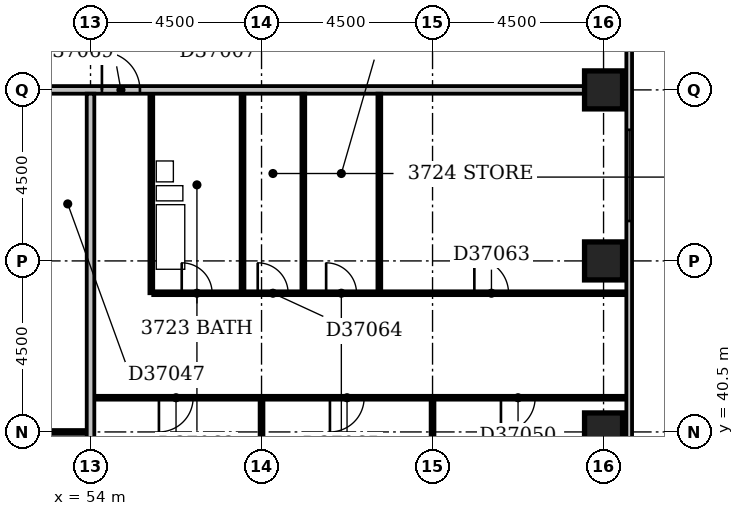
"""IFC4 building model, lengths in metres.
Left out: names, types, materials, properties, quantities, classifications, styles, units other than length and angle.
Written with IfcOpenShell. Run it as: python <this file> out.ifc"""

import sys

from ifc_helpers import new_model, si_unit, direction, frame, frame_2d, origin, origin_2d, place, context, subcontext, project, spatial, rectangle, extrude, element, fill, save


model = new_model("IFC4")
c1 = context("Model", 3, precision=1e-05, world=origin(), true_north=direction((0.0, 1.0)))
c2 = subcontext(c1, "Body", "Model", "MODEL_VIEW")
j1 = project(units=[si_unit("LENGTHUNIT", "METRE"), si_unit("PLANEANGLEUNIT", "RADIAN")], contexts=[c1])
p1 = place(None, origin())
s1 = spatial("IfcSite", under=j1, at=p1, CompositionType="ELEMENT")
p2 = place(p1, origin())
s2 = spatial("IfcBuilding", under=s1, at=p2, CompositionType="ELEMENT")
p3 = place(p2, frame((0.0, 0.0, 148.4)))
s3 = spatial("IfcBuildingStorey", under=s2, at=p3, CompositionType="ELEMENT", Elevation=148.4)
for number, where, z_axis, x_axis in (
    (1, (67.5, 40.5, -0.3), (0.0, 0.0, 1.0), (1.0, 0.0, 0.0)),
    (2, (67.5, 45.0, -0.3), (0.0, 0.0, 1.0), (1.0, 0.0, 0.0)),
    (3, (67.5, 49.5, -0.3), (0.0, 0.0, 1.0), (1.0, 0.0, 0.0)),
):
    element("IfcColumn", number, at=place(p3, frame(where, z_axis=z_axis, x_axis=x_axis)), inside=s3, PredefinedType="COLUMN", context=c2, shape_type="SweptSolid", body=[
        extrude(rectangle(XDim=1.0, YDim=1.0, at=origin_2d()), origin(), (0.0, 0.0, 1.0), 3.6),
    ])
p4 = place(p3, frame((68.175, 35.4, 0.0), z_axis=(0.0, 0.0, 1.0), x_axis=(0.0, 1.0, 0.0)))
e4 = element("IfcWall", 4, at=p4, inside=s3, PredefinedType="STANDARD", context=c2, shape_type="SweptSolid", body=[
    extrude(rectangle(XDim=23.85, YDim=0.15, at=frame_2d((11.925, 0.0))), origin(), (0.0, 0.0, 1.0), 2.7),
])
p5 = place(p4, frame((1.65, 0.0, 0.6)))
e5 = element("IfcOpeningElement", 5, at=p5, cuts=e4, PredefinedType="OPENING", context=c2, shape_type="SweptSolid", body=[
    extrude(rectangle(XDim=2.4, YDim=1.8, at=frame_2d((1.2, 0.9))), frame((0.0, 0.087, 0.0), z_axis=(0.0, -1.0, 0.0), x_axis=(1.0, 0.0, 0.0)), (0.0, 0.0, 1.0), 0.174),
])
p6 = place(p4, frame((10.65, 0.0, 0.6)))
e6 = element("IfcOpeningElement", 6, at=p6, cuts=e4, PredefinedType="OPENING", context=c2, shape_type="SweptSolid", body=[
    extrude(rectangle(XDim=2.4, YDim=1.8, at=frame_2d((1.2, 0.9))), frame((0.0, 0.087, 0.0), z_axis=(0.0, -1.0, 0.0), x_axis=(1.0, 0.0, 0.0)), (0.0, 0.0, 1.0), 0.174),
])
p7 = place(p4, frame((19.973, 0.0, 0.6)))
e7 = element("IfcOpeningElement", 7, at=p7, cuts=e4, PredefinedType="OPENING", context=c2, shape_type="SweptSolid", body=[
    extrude(rectangle(XDim=2.4, YDim=1.8, at=frame_2d((1.2, 0.9))), frame((0.0, 0.087, 0.0), z_axis=(0.0, -1.0, 0.0), x_axis=(1.0, 0.0, 0.0)), (0.0, 0.0, 1.0), 0.174),
])
p8 = place(p3, frame((54.0, 36.5, 0.0), z_axis=(0.0, 0.0, 1.0), x_axis=(0.0, 1.0, 0.0)))
e8 = element("IfcWall", 8, at=p8, inside=s3, PredefinedType="PARTITIONING", context=c2, shape_type="SweptSolid", body=[
    extrude(rectangle(XDim=12.9, YDim=0.2, at=frame_2d((6.45, 0.0))), origin(), (0.0, 0.0, 1.0), 2.6),
])
p9 = place(p3, frame((58.5, 36.5, 0.0), z_axis=(0.0, 0.0, 1.0), x_axis=(0.0, 1.0, 0.0)))
e9 = element("IfcWall", 9, at=p9, inside=s3, PredefinedType="PARTITIONING", context=c2, shape_type="SweptSolid", body=[
    extrude(rectangle(XDim=4.85, YDim=0.1, at=frame_2d((2.425, 0.0))), origin(), (0.0, 0.0, 1.0), 3.3),
])
p10 = place(p3, frame((63.0, 36.5, 0.0), z_axis=(0.0, 0.0, 1.0), x_axis=(0.0, 1.0, 0.0)))
e10 = element("IfcWall", 10, at=p10, inside=s3, PredefinedType="PARTITIONING", context=c2, shape_type="SweptSolid", body=[
    extrude(rectangle(XDim=4.85, YDim=0.1, at=frame_2d((2.425, 0.0))), origin(), (0.0, 0.0, 1.0), 2.4),
])
p11 = place(p3, frame((49.6, 40.5, 0.0), z_axis=(0.0, 0.0, 1.0), x_axis=(1.0, 0.0, 0.0)))
e11 = element("IfcWall", 11, at=p11, inside=s3, PredefinedType="PARTITIONING", context=c2, shape_type="SweptSolid", body=[
    extrude(rectangle(XDim=4.3, YDim=0.1, at=frame_2d((2.15, 0.0))), origin(), (0.0, 0.0, 1.0), 3.3),
])
p12 = place(p11, frame((1.7, 0.0, 0.0)))
e12 = element("IfcOpeningElement", 12, at=p12, cuts=e11, PredefinedType="OPENING", context=c2, shape_type="SweptSolid", body=[
    extrude(rectangle(XDim=0.9, YDim=2.1, at=frame_2d((0.45, 1.05))), frame((0.0, 0.062, 0.0), z_axis=(0.0, -1.0, 0.0), x_axis=(1.0, 0.0, 0.0)), (0.0, 0.0, 1.0), 0.124),
])
p13 = place(p3, frame((54.1, 41.4, 0.0), z_axis=(0.0, 0.0, 1.0), x_axis=(1.0, 0.0, 0.0)))
e13 = element("IfcWall", 13, at=p13, inside=s3, PredefinedType="PARTITIONING", context=c2, shape_type="SweptSolid", body=[
    extrude(rectangle(XDim=14.0, YDim=0.1, at=frame_2d((7.0, 0.0))), origin(), (0.0, 0.0, 1.0), 3.3),
])
p14 = place(p13, frame((1.7, 0.0, 0.0)))
e14 = element("IfcOpeningElement", 14, at=p14, cuts=e13, PredefinedType="OPENING", context=c2, shape_type="SweptSolid", body=[
    extrude(rectangle(XDim=0.9, YDim=2.1, at=frame_2d((0.45, 1.05))), frame((0.0, 0.062, 0.0), z_axis=(0.0, -1.0, 0.0), x_axis=(1.0, 0.0, 0.0)), (0.0, 0.0, 1.0), 0.124),
])
p15 = place(p13, frame((6.2, 0.0, 0.0)))
e15 = element("IfcOpeningElement", 15, at=p15, cuts=e13, PredefinedType="OPENING", context=c2, shape_type="SweptSolid", body=[
    extrude(rectangle(XDim=0.9, YDim=2.1, at=frame_2d((0.45, 1.05))), frame((0.0, 0.062, 0.0), z_axis=(0.0, -1.0, 0.0), x_axis=(1.0, 0.0, 0.0)), (0.0, 0.0, 1.0), 0.124),
])
p16 = place(p13, frame((10.7, 0.0, 0.0)))
e16 = element("IfcOpeningElement", 16, at=p16, cuts=e13, PredefinedType="OPENING", context=c2, shape_type="SweptSolid", body=[
    extrude(rectangle(XDim=0.9, YDim=2.1, at=frame_2d((0.45, 1.05))), frame((0.0, 0.062, 0.0), z_axis=(0.0, -1.0, 0.0), x_axis=(1.0, 0.0, 0.0)), (0.0, 0.0, 1.0), 0.124),
])
p17 = place(p3, frame((55.6, 44.15, 0.0), z_axis=(0.0, 0.0, 1.0), x_axis=(0.0, 1.0, 0.0)))
e17 = element("IfcWall", 17, at=p17, inside=s3, PredefinedType="PLUMBINGWALL", context=c2, shape_type="SweptSolid", body=[
    extrude(rectangle(XDim=5.25, YDim=0.1, at=frame_2d((2.625, 0.0))), origin(), (0.0, 0.0, 1.0), 3.3),
])
p18 = place(p3, frame((55.65, 44.15, 0.0), z_axis=(0.0, 0.0, 1.0), x_axis=(1.0, 0.0, 0.0)))
e18 = element("IfcWall", 18, at=p18, inside=s3, PredefinedType="PARTITIONING", context=c2, shape_type="SweptSolid", body=[
    extrude(rectangle(XDim=12.45, YDim=0.1, at=frame_2d((6.225, 0.0))), origin(), (0.0, 0.0, 1.0), 3.3),
])
p19 = place(p18, frame((0.75, 0.0, 0.0)))
e19 = element("IfcOpeningElement", 19, at=p19, cuts=e18, PredefinedType="OPENING", context=c2, shape_type="SweptSolid", body=[
    extrude(rectangle(XDim=0.8, YDim=2.1, at=frame_2d((0.4, 1.05))), frame((0.0, 0.062, 0.0), z_axis=(0.0, -1.0, 0.0), x_axis=(1.0, 0.0, 0.0)), (0.0, 0.0, 1.0), 0.124),
])
p20 = place(p18, frame((8.45, 0.0, 0.0)))
e20 = element("IfcOpeningElement", 20, at=p20, cuts=e18, PredefinedType="OPENING", context=c2, shape_type="SweptSolid", body=[
    extrude(rectangle(XDim=0.9, YDim=2.1, at=frame_2d((0.45, 1.05))), frame((0.0, 0.062, 0.0), z_axis=(0.0, -1.0, 0.0), x_axis=(1.0, 0.0, 0.0)), (0.0, 0.0, 1.0), 0.124),
])
p21 = place(p18, frame((2.75, 0.0, 0.0)))
e21 = element("IfcOpeningElement", 21, at=p21, cuts=e18, PredefinedType="OPENING", context=c2, shape_type="SweptSolid", body=[
    extrude(rectangle(XDim=0.8, YDim=2.1, at=frame_2d((0.4, 1.05))), frame((0.0, 0.062, 0.0), z_axis=(0.0, -1.0, 0.0), x_axis=(1.0, 0.0, 0.0)), (0.0, 0.0, 1.0), 0.124),
])
p22 = place(p18, frame((4.55, 0.0, 0.0)))
e22 = element("IfcOpeningElement", 22, at=p22, cuts=e18, PredefinedType="OPENING", context=c2, shape_type="SweptSolid", body=[
    extrude(rectangle(XDim=0.8, YDim=2.1, at=frame_2d((0.4, 1.05))), frame((0.0, 0.062, 0.0), z_axis=(0.0, -1.0, 0.0), x_axis=(1.0, 0.0, 0.0)), (0.0, 0.0, 1.0), 0.124),
])
p23 = place(p3, frame((58.0, 44.2, 0.0), z_axis=(0.0, 0.0, 1.0), x_axis=(0.0, 1.0, 0.0)))
e23 = element("IfcWall", 23, at=p23, inside=s3, PredefinedType="PLUMBINGWALL", context=c2, shape_type="SweptSolid", body=[
    extrude(rectangle(XDim=5.2, YDim=0.1, at=frame_2d((2.6, 0.0))), origin(), (0.0, 0.0, 1.0), 3.3),
])
for number, where, z_axis, x_axis in (
    (24, (59.6, 44.2, 0.0), (0.0, 0.0, 1.0), (0.0, 1.0, 0.0)),
    (25, (61.6, 44.2, 0.0), (0.0, 0.0, 1.0), (0.0, 1.0, 0.0)),
):
    element("IfcWall", number, at=place(p3, frame(where, z_axis=z_axis, x_axis=x_axis)), inside=s3, PredefinedType="PARTITIONING", context=c2, shape_type="SweptSolid", body=[
        extrude(rectangle(XDim=5.2, YDim=0.1, at=frame_2d((2.6, 0.0))), origin(), (0.0, 0.0, 1.0), 3.3),
    ])
p24 = place(p3, frame((52.85, 49.5, 0.0), z_axis=(0.0, 0.0, 1.0), x_axis=(1.0, 0.0, 0.0)))
e26 = element("IfcWall", 26, at=p24, inside=s3, PredefinedType="PARTITIONING", context=c2, shape_type="SweptSolid", body=[
    extrude(rectangle(XDim=14.15, YDim=0.2, at=frame_2d((7.075, 0.0))), origin(), (0.0, 0.0, 1.0), 3.3),
])
p25 = place(p24, frame((1.45, 0.0, 0.0)))
e27 = element("IfcOpeningElement", 27, at=p25, cuts=e26, PredefinedType="OPENING", context=c2, shape_type="SweptSolid", body=[
    extrude(rectangle(XDim=1.0, YDim=2.1, at=frame_2d((0.5, 1.05))), frame((0.0, 0.112, 0.0), z_axis=(0.0, -1.0, 0.0), x_axis=(1.0, 0.0, 0.0)), (0.0, 0.0, 1.0), 0.224),
])
p26 = place(p6, origin())
e28 = element("IfcWindow", 28, at=p26, inside=s3, PartitioningType="SINGLE_PANEL", PredefinedType="WINDOW", context=c2, shape_type="SweptSolid", body=[
    extrude(rectangle(XDim=2.4, YDim=1.8, at=frame_2d((1.2, 0.9))), frame((0.0, 0.03, 0.0), z_axis=(0.0, -1.0, 0.0), x_axis=(1.0, 0.0, 0.0)), (0.0, 0.0, 1.0), 0.06),
])
fill(e6, e28)
p27 = place(p14, frame((0.9, 0.0, 0.0), z_axis=(0.0, 0.0, 1.0), x_axis=(-1.0, 0.0, 0.0)))
e29 = element("IfcDoor", 29, at=p27, inside=s3, OperationType="SINGLE_SWING_RIGHT", PredefinedType="DOOR", context=c2, shape_type="SweptSolid", body=[
    extrude(rectangle(XDim=0.9, YDim=2.1, at=frame_2d((0.45, 1.05))), frame((0.0, 0.025, 0.0), z_axis=(0.0, -1.0, 0.0), x_axis=(1.0, 0.0, 0.0)), (0.0, 0.0, 1.0), 0.05),
])
fill(e14, e29)
p28 = place(p15, frame((0.9, 0.0, 0.0), z_axis=(0.0, 0.0, 1.0), x_axis=(-1.0, 0.0, 0.0)))
e30 = element("IfcDoor", 30, at=p28, inside=s3, OperationType="SINGLE_SWING_RIGHT", PredefinedType="DOOR", context=c2, shape_type="SweptSolid", body=[
    extrude(rectangle(XDim=0.9, YDim=2.1, at=frame_2d((0.45, 1.05))), frame((0.0, 0.025, 0.0), z_axis=(0.0, -1.0, 0.0), x_axis=(1.0, 0.0, 0.0)), (0.0, 0.0, 1.0), 0.05),
])
fill(e15, e30)
p29 = place(p16, frame((0.9, 0.0, 0.0), z_axis=(0.0, 0.0, 1.0), x_axis=(-1.0, 0.0, 0.0)))
e31 = element("IfcDoor", 31, at=p29, inside=s3, OperationType="SINGLE_SWING_RIGHT", PredefinedType="DOOR", context=c2, shape_type="SweptSolid", body=[
    extrude(rectangle(XDim=0.9, YDim=2.1, at=frame_2d((0.45, 1.05))), frame((0.0, 0.025, 0.0), z_axis=(0.0, -1.0, 0.0), x_axis=(1.0, 0.0, 0.0)), (0.0, 0.0, 1.0), 0.05),
])
fill(e16, e31)
p30 = place(p19, origin())
e32 = element("IfcDoor", 32, at=p30, inside=s3, OperationType="SINGLE_SWING_LEFT", PredefinedType="DOOR", context=c2, shape_type="SweptSolid", body=[
    extrude(rectangle(XDim=0.8, YDim=2.1, at=frame_2d((0.4, 1.05))), frame((0.0, 0.025, 0.0), z_axis=(0.0, -1.0, 0.0), x_axis=(1.0, 0.0, 0.0)), (0.0, 0.0, 1.0), 0.05),
])
fill(e19, e32)
p31 = place(p20, origin())
e33 = element("IfcDoor", 33, at=p31, inside=s3, OperationType="SINGLE_SWING_LEFT", PredefinedType="DOOR", context=c2, shape_type="SweptSolid", body=[
    extrude(rectangle(XDim=0.9, YDim=2.1, at=frame_2d((0.45, 1.05))), frame((0.0, 0.025, 0.0), z_axis=(0.0, -1.0, 0.0), x_axis=(1.0, 0.0, 0.0)), (0.0, 0.0, 1.0), 0.05),
])
fill(e20, e33)
p32 = place(p21, origin())
e34 = element("IfcDoor", 34, at=p32, inside=s3, OperationType="SINGLE_SWING_LEFT", PredefinedType="DOOR", context=c2, shape_type="SweptSolid", body=[
    extrude(rectangle(XDim=0.8, YDim=2.1, at=frame_2d((0.4, 1.05))), frame((0.0, 0.025, 0.0), z_axis=(0.0, -1.0, 0.0), x_axis=(1.0, 0.0, 0.0)), (0.0, 0.0, 1.0), 0.05),
])
fill(e21, e34)
p33 = place(p22, origin())
e35 = element("IfcDoor", 35, at=p33, inside=s3, OperationType="SINGLE_SWING_LEFT", PredefinedType="DOOR", context=c2, shape_type="SweptSolid", body=[
    extrude(rectangle(XDim=0.8, YDim=2.1, at=frame_2d((0.4, 1.05))), frame((0.0, 0.025, 0.0), z_axis=(0.0, -1.0, 0.0), x_axis=(1.0, 0.0, 0.0)), (0.0, 0.0, 1.0), 0.05),
])
fill(e22, e35)
p34 = place(p25, origin())
e36 = element("IfcDoor", 36, at=p34, inside=s3, OperationType="SINGLE_SWING_LEFT", PredefinedType="DOOR", context=c2, shape_type="SweptSolid", body=[
    extrude(rectangle(XDim=1.0, YDim=2.1, at=frame_2d((0.5, 1.05))), frame((0.0, 0.025, 0.0), z_axis=(0.0, -1.0, 0.0), x_axis=(1.0, 0.0, 0.0)), (0.0, 0.0, 1.0), 0.05),
])
fill(e27, e36)
save(model, sys.argv[1])
